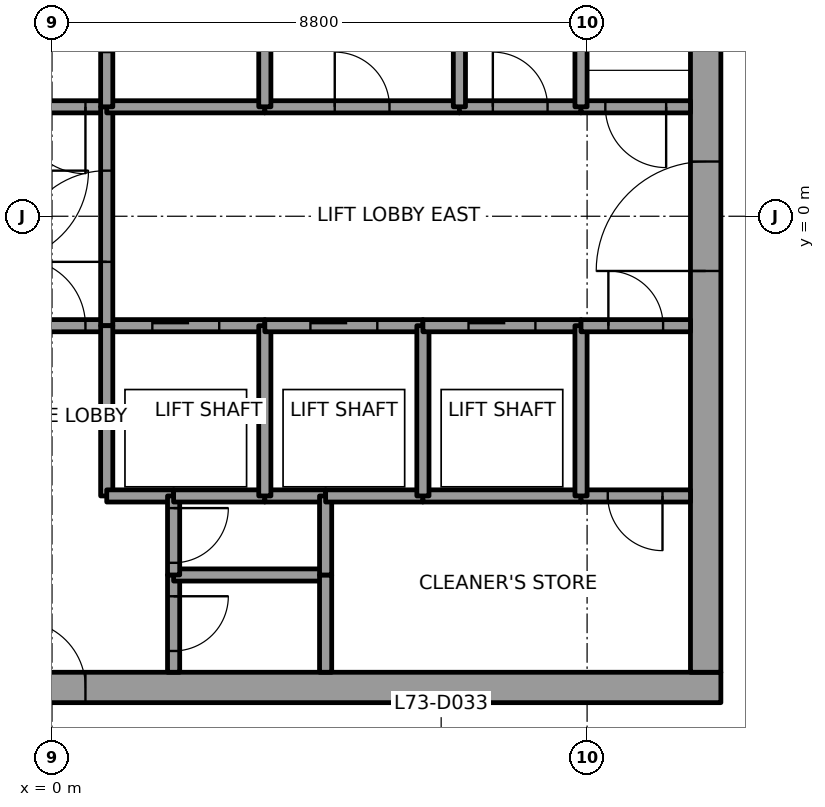
"""IFC4 building model, lengths in metres.
Left out: names, types, materials, properties, quantities, classifications, styles, units other than length and angle.
Written with IfcOpenShell. Run it as: python <this file> out.ifc"""

import sys

from ifc_helpers import new_model, si_unit, direction, frame, frame_2d, origin, place, context, subcontext, project, spatial, rectangle, extrude, element, fill, save


model = new_model("IFC4")
c1 = context("Model", 3, precision=1e-05, world=origin(), true_north=direction((0.0, 1.0)))
c2 = subcontext(c1, "Body", "Model", "MODEL_VIEW")
j1 = project(units=[si_unit("LENGTHUNIT", "METRE"), si_unit("PLANEANGLEUNIT", "RADIAN")], contexts=[c1])
p1 = place(None, origin())
s1 = spatial("IfcSite", under=j1, at=p1, CompositionType="ELEMENT")
p2 = place(p1, origin())
s2 = spatial("IfcBuilding", under=s1, at=p2, CompositionType="ELEMENT")
p3 = place(p2, frame((0.0, 0.0, 319.0)))
s3 = spatial("IfcBuildingStorey", under=s2, at=p3, CompositionType="ELEMENT", Elevation=319.0)
p4 = place(p3, frame((-11.0, -7.75, 0.0), z_axis=(0.0, 0.0, 1.0), x_axis=(1.0, 0.0, 0.0)))
e1 = element("IfcWall", 1, at=p4, inside=s3, PredefinedType="SHEAR", context=c2, shape_type="SweptSolid", body=[
    extrude(rectangle(XDim=22.0, YDim=0.5, at=frame_2d((11.0, 0.0))), origin(), (0.0, 0.0, 1.0), 5.4),
])
p5 = place(p4, frame((10.45, 0.0, 0.0)))
e2 = element("IfcOpeningElement", 2, at=p5, cuts=e1, PredefinedType="OPENING", context=c2, shape_type="SweptSolid", body=[
    extrude(rectangle(XDim=1.1, YDim=2.1, at=frame_2d((0.55, 1.05))), frame((0.0, 0.25, 0.0), z_axis=(0.0, -1.0, 0.0), x_axis=(1.0, 0.0, 0.0)), (0.0, 0.0, 1.0), 0.5),
])
p6 = place(p3, frame((10.75, -7.5, 0.0), z_axis=(0.0, 0.0, 1.0), x_axis=(0.0, 1.0, 0.0)))
e3 = element("IfcWall", 3, at=p6, inside=s3, PredefinedType="SHEAR", context=c2, shape_type="SweptSolid", body=[
    extrude(rectangle(XDim=15.0, YDim=0.5, at=frame_2d((7.5, 0.0))), origin(), (0.0, 0.0, 1.0), 5.4),
])
p7 = place(p6, frame((6.6, 0.0, 0.0)))
e4 = element("IfcOpeningElement", 4, at=p7, cuts=e3, PredefinedType="OPENING", context=c2, shape_type="SweptSolid", body=[
    extrude(rectangle(XDim=1.8, YDim=2.1, at=frame_2d((0.9, 1.05))), frame((0.0, 0.25, 0.0), z_axis=(0.0, -1.0, 0.0), x_axis=(1.0, 0.0, 0.0)), (0.0, 0.0, 1.0), 0.5),
])
p8 = place(p3, frame((-0.9, -1.8, 0.0), z_axis=(0.0, 0.0, 1.0), x_axis=(1.0, 0.0, 0.0)))
e5 = element("IfcWall", 5, at=p8, inside=s3, PredefinedType="SOLIDWALL", context=c2, shape_type="SweptSolid", body=[
    extrude(rectangle(XDim=1.8, YDim=0.2, at=frame_2d((0.9, 0.0))), origin(), (0.0, 0.0, 1.0), 5.25),
])
p9 = place(p8, frame((0.35, 0.0, 0.0)))
e6 = element("IfcOpeningElement", 6, at=p9, cuts=e5, PredefinedType="OPENING", context=c2, shape_type="SweptSolid", body=[
    extrude(rectangle(XDim=1.1, YDim=2.1, at=frame_2d((0.55, 1.05))), frame((0.0, 0.1, 0.0), z_axis=(0.0, -1.0, 0.0), x_axis=(1.0, 0.0, 0.0)), (0.0, 0.0, 1.0), 0.2),
])
p10 = place(p3, frame((0.9, 1.8, 0.0), z_axis=(0.0, 0.0, 1.0), x_axis=(-1.0, 0.0, 0.0)))
e7 = element("IfcWall", 7, at=p10, inside=s3, PredefinedType="SOLIDWALL", context=c2, shape_type="SweptSolid", body=[
    extrude(rectangle(XDim=1.8, YDim=0.2, at=frame_2d((0.9, 0.0))), origin(), (0.0, 0.0, 1.0), 5.25),
])
p11 = place(p10, frame((0.35, 0.0, 0.0)))
e8 = element("IfcOpeningElement", 8, at=p11, cuts=e7, PredefinedType="OPENING", context=c2, shape_type="SweptSolid", body=[
    extrude(rectangle(XDim=1.1, YDim=2.1, at=frame_2d((0.55, 1.05))), frame((0.0, 0.1, 0.0), z_axis=(0.0, -1.0, 0.0), x_axis=(1.0, 0.0, 0.0)), (0.0, 0.0, 1.0), 0.2),
])
p12 = place(p3, frame((0.9, -1.8, 0.0), z_axis=(0.0, 0.0, 1.0), x_axis=(1.0, 0.0, 0.0)))
e9 = element("IfcWall", 9, at=p12, inside=s3, PredefinedType="SOLIDWALL", context=c2, shape_type="SweptSolid", body=[
    extrude(rectangle(XDim=2.6, YDim=0.2, at=frame_2d((1.3, 0.0))), origin(), (0.0, 0.0, 1.0), 5.25),
])
p13 = place(p12, frame((0.75, 0.0, 0.0)))
e10 = element("IfcOpeningElement", 10, at=p13, cuts=e9, PredefinedType="OPENING", context=c2, shape_type="SweptSolid", body=[
    extrude(rectangle(XDim=1.1, YDim=2.1, at=frame_2d((0.55, 1.05))), frame((0.0, 0.1, 0.0), z_axis=(0.0, -1.0, 0.0), x_axis=(1.0, 0.0, 0.0)), (0.0, 0.0, 1.0), 0.2),
])
p14 = place(p3, frame((0.9, -1.8, 0.0), z_axis=(0.0, 0.0, 1.0), x_axis=(0.0, 1.0, 0.0)))
e11 = element("IfcWall", 11, at=p14, inside=s3, PredefinedType="SOLIDWALL", context=c2, shape_type="SweptSolid", body=[
    extrude(rectangle(XDim=3.6, YDim=0.2, at=frame_2d((1.8, 0.0))), origin(), (0.0, 0.0, 1.0), 5.25),
])
p15 = place(p14, frame((1.05, 0.0, 0.0)))
e12 = element("IfcOpeningElement", 12, at=p15, cuts=e11, PredefinedType="OPENING", context=c2, shape_type="SweptSolid", body=[
    extrude(rectangle(XDim=1.5, YDim=2.1, at=frame_2d((0.75, 1.05))), frame((0.0, 0.1, 0.0), z_axis=(0.0, -1.0, 0.0), x_axis=(1.0, 0.0, 0.0)), (0.0, 0.0, 1.0), 0.2),
])
p16 = place(p3, frame((0.9, -1.8, 0.0), z_axis=(0.0, 0.0, 1.0), x_axis=(0.0, -1.0, 0.0)))
e13 = element("IfcWall", 13, at=p16, inside=s3, PredefinedType="SOLIDWALL", context=c2, shape_type="SweptSolid", body=[
    extrude(rectangle(XDim=2.8, YDim=0.2, at=frame_2d((1.4, 0.0))), origin(), (0.0, 0.0, 1.0), 5.25),
])
p17 = place(p3, frame((0.9, -4.6, 0.0), z_axis=(0.0, 0.0, 1.0), x_axis=(1.0, 0.0, 0.0)))
e14 = element("IfcWall", 14, at=p17, inside=s3, PredefinedType="SOLIDWALL", context=c2, shape_type="SweptSolid", body=[
    extrude(rectangle(XDim=1.1, YDim=0.2, at=frame_2d((0.55, 0.0))), origin(), (0.0, 0.0, 1.0), 5.25),
])
p18 = place(p3, frame((3.5, 1.8, 0.0), z_axis=(0.0, 0.0, 1.0), x_axis=(-1.0, 0.0, 0.0)))
e15 = element("IfcWall", 15, at=p18, inside=s3, PredefinedType="SOLIDWALL", context=c2, shape_type="SweptSolid", body=[
    extrude(rectangle(XDim=2.6, YDim=0.2, at=frame_2d((1.3, 0.0))), origin(), (0.0, 0.0, 1.0), 5.25),
])
p19 = place(p3, frame((0.9, 4.8, 0.0), z_axis=(0.0, 0.0, 1.0), x_axis=(0.0, -1.0, 0.0)))
e16 = element("IfcWall", 16, at=p19, inside=s3, PredefinedType="SOLIDWALL", context=c2, shape_type="SweptSolid", body=[
    extrude(rectangle(XDim=3.0, YDim=0.2, at=frame_2d((1.5, 0.0))), origin(), (0.0, 0.0, 1.0), 5.25),
])
p20 = place(p19, frame((0.9, 0.0, 0.0)))
e17 = element("IfcOpeningElement", 17, at=p20, cuts=e16, PredefinedType="OPENING", context=c2, shape_type="SweptSolid", body=[
    extrude(rectangle(XDim=1.2, YDim=2.1, at=frame_2d((0.6, 1.05))), frame((0.0, 0.1, 0.0), z_axis=(0.0, -1.0, 0.0), x_axis=(1.0, 0.0, 0.0)), (0.0, 0.0, 1.0), 0.2),
])
p21 = place(p3, frame((2.0, -5.9, 0.0), z_axis=(0.0, 0.0, 1.0), x_axis=(0.0, -1.0, 0.0)))
e18 = element("IfcWall", 18, at=p21, inside=s3, PredefinedType="SOLIDWALL", context=c2, shape_type="SweptSolid", body=[
    extrude(rectangle(XDim=1.6, YDim=0.2, at=frame_2d((0.8, 0.0))), origin(), (0.0, 0.0, 1.0), 5.25),
])
p22 = place(p21, frame((0.35, 0.0, 0.0)))
e19 = element("IfcOpeningElement", 19, at=p22, cuts=e18, PredefinedType="OPENING", context=c2, shape_type="SweptSolid", body=[
    extrude(rectangle(XDim=0.9, YDim=2.1, at=frame_2d((0.45, 1.05))), frame((0.0, 0.1, 0.0), z_axis=(0.0, -1.0, 0.0), x_axis=(1.0, 0.0, 0.0)), (0.0, 0.0, 1.0), 0.2),
])
p23 = place(p3, frame((4.5, -5.9, 0.0), z_axis=(0.0, 0.0, 1.0), x_axis=(-1.0, 0.0, 0.0)))
e20 = element("IfcWall", 20, at=p23, inside=s3, PredefinedType="SOLIDWALL", context=c2, shape_type="SweptSolid", body=[
    extrude(rectangle(XDim=2.5, YDim=0.2, at=frame_2d((1.25, 0.0))), origin(), (0.0, 0.0, 1.0), 5.25),
])
p24 = place(p3, frame((2.0, -4.6, 0.0), z_axis=(0.0, 0.0, 1.0), x_axis=(0.0, -1.0, 0.0)))
e21 = element("IfcWall", 21, at=p24, inside=s3, PredefinedType="SOLIDWALL", context=c2, shape_type="SweptSolid", body=[
    extrude(rectangle(XDim=1.3, YDim=0.2, at=frame_2d((0.65, 0.0))), origin(), (0.0, 0.0, 1.0), 5.25),
])
p25 = place(p24, frame((0.2, 0.0, 0.0)))
e22 = element("IfcOpeningElement", 22, at=p25, cuts=e21, PredefinedType="OPENING", context=c2, shape_type="SweptSolid", body=[
    extrude(rectangle(XDim=0.9, YDim=2.1, at=frame_2d((0.45, 1.05))), frame((0.0, 0.1, 0.0), z_axis=(0.0, -1.0, 0.0), x_axis=(1.0, 0.0, 0.0)), (0.0, 0.0, 1.0), 0.2),
])
p26 = place(p3, frame((3.5, -4.6, 0.0), z_axis=(0.0, 0.0, 1.0), x_axis=(-1.0, 0.0, 0.0)))
e23 = element("IfcWall", 23, at=p26, inside=s3, PredefinedType="SOLIDWALL", context=c2, shape_type="SweptSolid", body=[
    extrude(rectangle(XDim=1.5, YDim=0.2, at=frame_2d((0.75, 0.0))), origin(), (0.0, 0.0, 1.0), 5.25),
])
p27 = place(p3, frame((4.5, -4.6, 0.0), z_axis=(0.0, 0.0, 1.0), x_axis=(-1.0, 0.0, 0.0)))
e24 = element("IfcWall", 24, at=p27, inside=s3, PredefinedType="SOLIDWALL", context=c2, shape_type="SweptSolid", body=[
    extrude(rectangle(XDim=1.0, YDim=0.2, at=frame_2d((0.5, 0.0))), origin(), (0.0, 0.0, 1.0), 5.25),
])
p28 = place(p3, frame((3.5, -4.6, 0.0), z_axis=(0.0, 0.0, 1.0), x_axis=(0.0, 1.0, 0.0)))
e25 = element("IfcWall", 25, at=p28, inside=s3, PredefinedType="SOLIDWALL", context=c2, shape_type="SweptSolid", body=[
    extrude(rectangle(XDim=2.8, YDim=0.2, at=frame_2d((1.4, 0.0))), origin(), (0.0, 0.0, 1.0), 5.25),
])
p29 = place(p3, frame((3.5, -1.8, 0.0), z_axis=(0.0, 0.0, 1.0), x_axis=(1.0, 0.0, 0.0)))
e26 = element("IfcWall", 26, at=p29, inside=s3, PredefinedType="SOLIDWALL", context=c2, shape_type="SweptSolid", body=[
    extrude(rectangle(XDim=2.6, YDim=0.2, at=frame_2d((1.3, 0.0))), origin(), (0.0, 0.0, 1.0), 5.25),
])
p30 = place(p29, frame((0.75, 0.0, 0.0)))
e27 = element("IfcOpeningElement", 27, at=p30, cuts=e26, PredefinedType="OPENING", context=c2, shape_type="SweptSolid", body=[
    extrude(rectangle(XDim=1.1, YDim=2.1, at=frame_2d((0.55, 1.05))), frame((0.0, 0.1, 0.0), z_axis=(0.0, -1.0, 0.0), x_axis=(1.0, 0.0, 0.0)), (0.0, 0.0, 1.0), 0.2),
])
p31 = place(p3, frame((3.5, 1.8, 0.0), z_axis=(0.0, 0.0, 1.0), x_axis=(1.0, 0.0, 0.0)))
e28 = element("IfcWall", 28, at=p31, inside=s3, PredefinedType="SOLIDWALL", context=c2, shape_type="SweptSolid", body=[
    extrude(rectangle(XDim=3.2, YDim=0.2, at=frame_2d((1.6, 0.0))), origin(), (0.0, 0.0, 1.0), 5.25),
])
p32 = place(p31, frame((1.15, 0.0, 0.0)))
e29 = element("IfcOpeningElement", 29, at=p32, cuts=e28, PredefinedType="OPENING", context=c2, shape_type="SweptSolid", body=[
    extrude(rectangle(XDim=0.9, YDim=2.1, at=frame_2d((0.45, 1.05))), frame((0.0, 0.1, 0.0), z_axis=(0.0, -1.0, 0.0), x_axis=(1.0, 0.0, 0.0)), (0.0, 0.0, 1.0), 0.2),
])
p33 = place(p3, frame((3.5, 4.6, 0.0), z_axis=(0.0, 0.0, 1.0), x_axis=(0.0, -1.0, 0.0)))
e30 = element("IfcWall", 30, at=p33, inside=s3, PredefinedType="SOLIDWALL", context=c2, shape_type="SweptSolid", body=[
    extrude(rectangle(XDim=2.8, YDim=0.2, at=frame_2d((1.4, 0.0))), origin(), (0.0, 0.0, 1.0), 5.25),
])
p34 = place(p3, frame((4.5, -5.9, 0.0), z_axis=(0.0, 0.0, 1.0), x_axis=(0.0, -1.0, 0.0)))
e31 = element("IfcWall", 31, at=p34, inside=s3, PredefinedType="SOLIDWALL", context=c2, shape_type="SweptSolid", body=[
    extrude(rectangle(XDim=1.6, YDim=0.2, at=frame_2d((0.8, 0.0))), origin(), (0.0, 0.0, 1.0), 5.25),
])
p35 = place(p3, frame((4.5, -4.6, 0.0), z_axis=(0.0, 0.0, 1.0), x_axis=(0.0, -1.0, 0.0)))
e32 = element("IfcWall", 32, at=p35, inside=s3, PredefinedType="SOLIDWALL", context=c2, shape_type="SweptSolid", body=[
    extrude(rectangle(XDim=1.3, YDim=0.2, at=frame_2d((0.65, 0.0))), origin(), (0.0, 0.0, 1.0), 5.25),
])
p36 = place(p3, frame((6.1, -4.6, 0.0), z_axis=(0.0, 0.0, 1.0), x_axis=(-1.0, 0.0, 0.0)))
e33 = element("IfcWall", 33, at=p36, inside=s3, PredefinedType="SOLIDWALL", context=c2, shape_type="SweptSolid", body=[
    extrude(rectangle(XDim=1.6, YDim=0.2, at=frame_2d((0.8, 0.0))), origin(), (0.0, 0.0, 1.0), 5.25),
])
p37 = place(p3, frame((8.7, -4.6, 0.0), z_axis=(0.0, 0.0, 1.0), x_axis=(-1.0, 0.0, 0.0)))
e34 = element("IfcWall", 34, at=p37, inside=s3, PredefinedType="SOLIDWALL", context=c2, shape_type="SweptSolid", body=[
    extrude(rectangle(XDim=2.6, YDim=0.2, at=frame_2d((1.3, 0.0))), origin(), (0.0, 0.0, 1.0), 5.25),
])
p38 = place(p3, frame((6.1, -4.6, 0.0), z_axis=(0.0, 0.0, 1.0), x_axis=(0.0, 1.0, 0.0)))
e35 = element("IfcWall", 35, at=p38, inside=s3, PredefinedType="SOLIDWALL", context=c2, shape_type="SweptSolid", body=[
    extrude(rectangle(XDim=2.8, YDim=0.2, at=frame_2d((1.4, 0.0))), origin(), (0.0, 0.0, 1.0), 5.25),
])
p39 = place(p3, frame((6.1, -1.8, 0.0), z_axis=(0.0, 0.0, 1.0), x_axis=(1.0, 0.0, 0.0)))
e36 = element("IfcWall", 36, at=p39, inside=s3, PredefinedType="SOLIDWALL", context=c2, shape_type="SweptSolid", body=[
    extrude(rectangle(XDim=2.6, YDim=0.2, at=frame_2d((1.3, 0.0))), origin(), (0.0, 0.0, 1.0), 5.25),
])
p40 = place(p39, frame((0.75, 0.0, 0.0)))
e37 = element("IfcOpeningElement", 37, at=p40, cuts=e36, PredefinedType="OPENING", context=c2, shape_type="SweptSolid", body=[
    extrude(rectangle(XDim=1.1, YDim=2.1, at=frame_2d((0.55, 1.05))), frame((0.0, 0.1, 0.0), z_axis=(0.0, -1.0, 0.0), x_axis=(1.0, 0.0, 0.0)), (0.0, 0.0, 1.0), 0.2),
])
p41 = place(p3, frame((6.7, 1.8, 0.0), z_axis=(0.0, 0.0, 1.0), x_axis=(1.0, 0.0, 0.0)))
e38 = element("IfcWall", 38, at=p41, inside=s3, PredefinedType="SOLIDWALL", context=c2, shape_type="SweptSolid", body=[
    extrude(rectangle(XDim=2.0, YDim=0.2, at=frame_2d((1.0, 0.0))), origin(), (0.0, 0.0, 1.0), 5.25),
])
p42 = place(p41, frame((0.55, 0.0, 0.0)))
e39 = element("IfcOpeningElement", 39, at=p42, cuts=e38, PredefinedType="OPENING", context=c2, shape_type="SweptSolid", body=[
    extrude(rectangle(XDim=0.9, YDim=2.1, at=frame_2d((0.45, 1.05))), frame((0.0, 0.1, 0.0), z_axis=(0.0, -1.0, 0.0), x_axis=(1.0, 0.0, 0.0)), (0.0, 0.0, 1.0), 0.2),
])
p43 = place(p3, frame((6.7, 1.8, 0.0), z_axis=(0.0, 0.0, 1.0), x_axis=(0.0, 1.0, 0.0)))
e40 = element("IfcWall", 40, at=p43, inside=s3, PredefinedType="SOLIDWALL", context=c2, shape_type="SweptSolid", body=[
    extrude(rectangle(XDim=2.8, YDim=0.2, at=frame_2d((1.4, 0.0))), origin(), (0.0, 0.0, 1.0), 5.25),
])
p44 = place(p3, frame((10.5, -4.6, 0.0), z_axis=(0.0, 0.0, 1.0), x_axis=(-1.0, 0.0, 0.0)))
e41 = element("IfcWall", 41, at=p44, inside=s3, PredefinedType="SOLIDWALL", context=c2, shape_type="SweptSolid", body=[
    extrude(rectangle(XDim=1.8, YDim=0.2, at=frame_2d((0.9, 0.0))), origin(), (0.0, 0.0, 1.0), 5.25),
])
p45 = place(p44, frame((0.46, 0.0, 0.0)))
e42 = element("IfcOpeningElement", 42, at=p45, cuts=e41, PredefinedType="OPENING", context=c2, shape_type="SweptSolid", body=[
    extrude(rectangle(XDim=0.9, YDim=2.1, at=frame_2d((0.45, 1.05))), frame((0.0, 0.1, 0.0), z_axis=(0.0, -1.0, 0.0), x_axis=(1.0, 0.0, 0.0)), (0.0, 0.0, 1.0), 0.2),
])
p46 = place(p3, frame((8.7, -1.8, 0.0), z_axis=(0.0, 0.0, 1.0), x_axis=(0.0, -1.0, 0.0)))
e43 = element("IfcWall", 43, at=p46, inside=s3, PredefinedType="SOLIDWALL", context=c2, shape_type="SweptSolid", body=[
    extrude(rectangle(XDim=2.8, YDim=0.2, at=frame_2d((1.4, 0.0))), origin(), (0.0, 0.0, 1.0), 5.25),
])
p47 = place(p3, frame((8.7, -1.8, 0.0), z_axis=(0.0, 0.0, 1.0), x_axis=(1.0, 0.0, 0.0)))
e44 = element("IfcWall", 44, at=p47, inside=s3, PredefinedType="SOLIDWALL", context=c2, shape_type="SweptSolid", body=[
    extrude(rectangle(XDim=1.8, YDim=0.2, at=frame_2d((0.9, 0.0))), origin(), (0.0, 0.0, 1.0), 5.25),
])
p48 = place(p47, frame((0.45, 0.0, 0.0)))
e45 = element("IfcOpeningElement", 45, at=p48, cuts=e44, PredefinedType="OPENING", context=c2, shape_type="SweptSolid", body=[
    extrude(rectangle(XDim=0.9, YDim=2.1, at=frame_2d((0.45, 1.05))), frame((0.0, 0.1, 0.0), z_axis=(0.0, -1.0, 0.0), x_axis=(1.0, 0.0, 0.0)), (0.0, 0.0, 1.0), 0.2),
])
p49 = place(p3, frame((10.5, 1.8, 0.0), z_axis=(0.0, 0.0, 1.0), x_axis=(-1.0, 0.0, 0.0)))
e46 = element("IfcWall", 46, at=p49, inside=s3, PredefinedType="SOLIDWALL", context=c2, shape_type="SweptSolid", body=[
    extrude(rectangle(XDim=1.8, YDim=0.2, at=frame_2d((0.9, 0.0))), origin(), (0.0, 0.0, 1.0), 5.25),
])
p50 = place(p49, frame((0.4, 0.0, 0.0)))
e47 = element("IfcOpeningElement", 47, at=p50, cuts=e46, PredefinedType="OPENING", context=c2, shape_type="SweptSolid", body=[
    extrude(rectangle(XDim=1.0, YDim=2.1, at=frame_2d((0.5, 1.05))), frame((0.0, 0.1, 0.0), z_axis=(0.0, -1.0, 0.0), x_axis=(1.0, 0.0, 0.0)), (0.0, 0.0, 1.0), 0.2),
])
p51 = place(p3, frame((8.7, 1.8, 0.0), z_axis=(0.0, 0.0, 1.0), x_axis=(0.0, 1.0, 0.0)))
e48 = element("IfcWall", 48, at=p51, inside=s3, PredefinedType="SOLIDWALL", context=c2, shape_type="SweptSolid", body=[
    extrude(rectangle(XDim=2.8, YDim=0.2, at=frame_2d((1.4, 0.0))), origin(), (0.0, 0.0, 1.0), 5.25),
])
p52 = place(p13, origin())
e49 = element("IfcDoor", 49, at=p52, inside=s3, OperationType="SLIDING_TO_RIGHT", PredefinedType="DOOR", context=c2, shape_type="SweptSolid", body=[
    extrude(rectangle(XDim=1.1, YDim=2.1, at=frame_2d((0.55, 1.05))), frame((0.0, 0.025, 0.0), z_axis=(0.0, -1.0, 0.0), x_axis=(1.0, 0.0, 0.0)), (0.0, 0.0, 1.0), 0.05),
])
fill(e10, e49)
p53 = place(p30, origin())
e50 = element("IfcDoor", 50, at=p53, inside=s3, OperationType="SLIDING_TO_RIGHT", PredefinedType="DOOR", context=c2, shape_type="SweptSolid", body=[
    extrude(rectangle(XDim=1.1, YDim=2.1, at=frame_2d((0.55, 1.05))), frame((0.0, 0.025, 0.0), z_axis=(0.0, -1.0, 0.0), x_axis=(1.0, 0.0, 0.0)), (0.0, 0.0, 1.0), 0.05),
])
fill(e27, e50)
p54 = place(p40, origin())
e51 = element("IfcDoor", 51, at=p54, inside=s3, OperationType="SLIDING_TO_LEFT", PredefinedType="DOOR", context=c2, shape_type="SweptSolid", body=[
    extrude(rectangle(XDim=1.1, YDim=2.1, at=frame_2d((0.55, 1.05))), frame((0.0, 0.025, 0.0), z_axis=(0.0, -1.0, 0.0), x_axis=(1.0, 0.0, 0.0)), (0.0, 0.0, 1.0), 0.05),
])
fill(e37, e51)
p55 = place(p15, origin())
e52 = element("IfcDoor", 52, at=p55, inside=s3, OperationType="DOUBLE_DOOR_SINGLE_SWING", PredefinedType="DOOR", context=c2, shape_type="SweptSolid", body=[
    extrude(rectangle(XDim=1.5, YDim=2.1, at=frame_2d((0.75, 1.05))), frame((0.0, 0.025, 0.0), z_axis=(0.0, -1.0, 0.0), x_axis=(1.0, 0.0, 0.0)), (0.0, 0.0, 1.0), 0.05),
])
fill(e12, e52)
p56 = place(p11, origin())
e53 = element("IfcDoor", 53, at=p56, inside=s3, OperationType="SINGLE_SWING_RIGHT", PredefinedType="DOOR", context=c2, shape_type="SweptSolid", body=[
    extrude(rectangle(XDim=1.1, YDim=2.1, at=frame_2d((0.55, 1.05))), frame((0.0, 0.025, 0.0), z_axis=(0.0, -1.0, 0.0), x_axis=(1.0, 0.0, 0.0)), (0.0, 0.0, 1.0), 0.05),
])
fill(e8, e53)
p57 = place(p9, origin())
e54 = element("IfcDoor", 54, at=p57, inside=s3, OperationType="SINGLE_SWING_LEFT", PredefinedType="DOOR", context=c2, shape_type="SweptSolid", body=[
    extrude(rectangle(XDim=1.1, YDim=2.1, at=frame_2d((0.55, 1.05))), frame((0.0, 0.025, 0.0), z_axis=(0.0, -1.0, 0.0), x_axis=(1.0, 0.0, 0.0)), (0.0, 0.0, 1.0), 0.05),
])
fill(e6, e54)
p58 = place(p50, origin())
e55 = element("IfcDoor", 55, at=p58, inside=s3, OperationType="SINGLE_SWING_LEFT", PredefinedType="DOOR", context=c2, shape_type="SweptSolid", body=[
    extrude(rectangle(XDim=1.0, YDim=2.1, at=frame_2d((0.5, 1.05))), frame((0.0, 0.025, 0.0), z_axis=(0.0, -1.0, 0.0), x_axis=(1.0, 0.0, 0.0)), (0.0, 0.0, 1.0), 0.05),
])
fill(e47, e55)
p59 = place(p32, origin())
e56 = element("IfcDoor", 56, at=p59, inside=s3, OperationType="SINGLE_SWING_LEFT", PredefinedType="DOOR", context=c2, shape_type="SweptSolid", body=[
    extrude(rectangle(XDim=0.9, YDim=2.1, at=frame_2d((0.45, 1.05))), frame((0.0, 0.025, 0.0), z_axis=(0.0, -1.0, 0.0), x_axis=(1.0, 0.0, 0.0)), (0.0, 0.0, 1.0), 0.05),
])
fill(e29, e56)
p60 = place(p42, origin())
e57 = element("IfcDoor", 57, at=p60, inside=s3, OperationType="SINGLE_SWING_LEFT", PredefinedType="DOOR", context=c2, shape_type="SweptSolid", body=[
    extrude(rectangle(XDim=0.9, YDim=2.1, at=frame_2d((0.45, 1.05))), frame((0.0, 0.025, 0.0), z_axis=(0.0, -1.0, 0.0), x_axis=(1.0, 0.0, 0.0)), (0.0, 0.0, 1.0), 0.05),
])
fill(e39, e57)
p61 = place(p45, origin())
e58 = element("IfcDoor", 58, at=p61, inside=s3, OperationType="SINGLE_SWING_LEFT", PredefinedType="DOOR", context=c2, shape_type="SweptSolid", body=[
    extrude(rectangle(XDim=0.9, YDim=2.1, at=frame_2d((0.45, 1.05))), frame((0.0, 0.025, 0.0), z_axis=(0.0, -1.0, 0.0), x_axis=(1.0, 0.0, 0.0)), (0.0, 0.0, 1.0), 0.05),
])
fill(e42, e58)
p62 = place(p48, origin())
e59 = element("IfcDoor", 59, at=p62, inside=s3, OperationType="SINGLE_SWING_LEFT", PredefinedType="DOOR", context=c2, shape_type="SweptSolid", body=[
    extrude(rectangle(XDim=0.9, YDim=2.1, at=frame_2d((0.45, 1.05))), frame((0.0, 0.025, 0.0), z_axis=(0.0, -1.0, 0.0), x_axis=(1.0, 0.0, 0.0)), (0.0, 0.0, 1.0), 0.05),
])
fill(e45, e59)
p63 = place(p22, origin())
e60 = element("IfcDoor", 60, at=p63, inside=s3, OperationType="SINGLE_SWING_RIGHT", PredefinedType="DOOR", context=c2, shape_type="SweptSolid", body=[
    extrude(rectangle(XDim=0.9, YDim=2.1, at=frame_2d((0.45, 1.05))), frame((0.0, 0.025, 0.0), z_axis=(0.0, -1.0, 0.0), x_axis=(1.0, 0.0, 0.0)), (0.0, 0.0, 1.0), 0.05),
])
fill(e19, e60)
p64 = place(p25, origin())
e61 = element("IfcDoor", 61, at=p64, inside=s3, OperationType="SINGLE_SWING_RIGHT", PredefinedType="DOOR", context=c2, shape_type="SweptSolid", body=[
    extrude(rectangle(XDim=0.9, YDim=2.1, at=frame_2d((0.45, 1.05))), frame((0.0, 0.025, 0.0), z_axis=(0.0, -1.0, 0.0), x_axis=(1.0, 0.0, 0.0)), (0.0, 0.0, 1.0), 0.05),
])
fill(e22, e61)
p65 = place(p7, origin())
e62 = element("IfcDoor", 62, at=p65, inside=s3, OperationType="DOUBLE_DOOR_SINGLE_SWING", PredefinedType="DOOR", context=c2, shape_type="SweptSolid", body=[
    extrude(rectangle(XDim=1.8, YDim=2.1, at=frame_2d((0.9, 1.05))), frame((0.0, 0.025, 0.0), z_axis=(0.0, -1.0, 0.0), x_axis=(1.0, 0.0, 0.0)), (0.0, 0.0, 1.0), 0.05),
])
fill(e4, e62)
p66 = place(p5, origin())
e63 = element("IfcDoor", 63, at=p66, inside=s3, OperationType="SINGLE_SWING_RIGHT", PredefinedType="DOOR", context=c2, shape_type="SweptSolid", body=[
    extrude(rectangle(XDim=1.1, YDim=2.1, at=frame_2d((0.55, 1.05))), frame((0.0, 0.025, 0.0), z_axis=(0.0, -1.0, 0.0), x_axis=(1.0, 0.0, 0.0)), (0.0, 0.0, 1.0), 0.05),
])
fill(e2, e63)
save(model, sys.argv[1])
